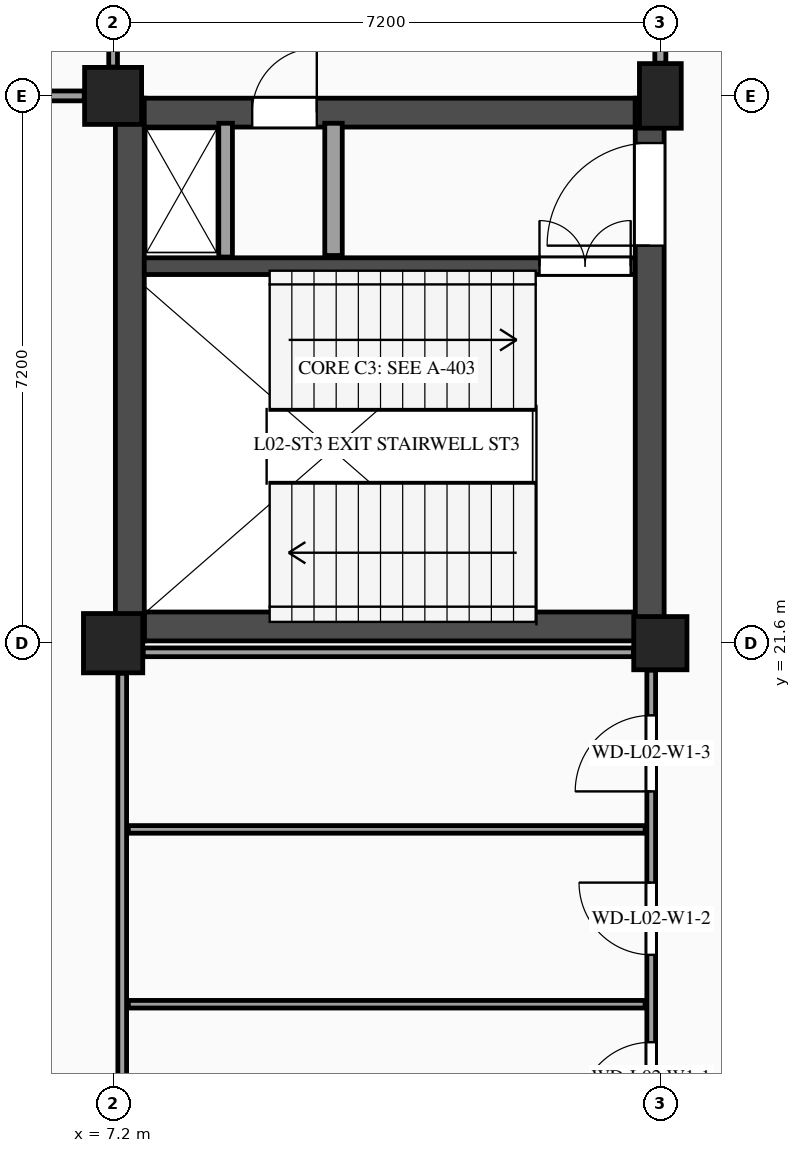
"""IFC4 building model, lengths in metres.
Left out: names, types, materials, properties, quantities, classifications, styles, units other than length and angle.
Written with IfcOpenShell. Run it as: python <this file> out.ifc"""

import sys

from ifc_helpers import new_model, si_unit, direction, frame, frame_2d, origin, origin_2d, place, context, subcontext, project, spatial, rectangle, extrude, element, fill, save


model = new_model("IFC4")
c1 = context("Model", 3, precision=1e-05, world=origin(), true_north=direction((0.0, 1.0)))
c2 = subcontext(c1, "Body", "Model", "MODEL_VIEW")
j1 = project(units=[si_unit("LENGTHUNIT", "METRE"), si_unit("PLANEANGLEUNIT", "RADIAN")], contexts=[c1])
p1 = place(None, origin())
s1 = spatial("IfcSite", under=j1, at=p1, CompositionType="ELEMENT")
p2 = place(p1, origin())
s2 = spatial("IfcBuilding", under=s1, at=p2, CompositionType="ELEMENT")
p3 = place(p2, frame((0.0, 0.0, 9.9)))
s3 = spatial("IfcBuildingStorey", under=s2, at=p3, CompositionType="ELEMENT", Elevation=9.9)
p4 = place(p3, frame((7.2, 21.6, 0.0), z_axis=(0.0, 0.0, 1.0), x_axis=(1.0, 0.0, 0.0)))
e1 = element("IfcColumn", 1, at=p4, inside=s3, PredefinedType="COLUMN", context=c2, shape_type="SweptSolid", body=[
    extrude(rectangle(XDim=0.78, YDim=0.78, at=origin_2d()), origin(), (0.0, 0.0, 1.0), 4.5),
])
p5 = place(p3, frame((7.2, 28.8, 0.0), z_axis=(0.0, 0.0, 1.0), x_axis=(1.0, 0.0, 0.0)))
e2 = element("IfcColumn", 2, at=p5, inside=s3, PredefinedType="COLUMN", context=c2, shape_type="SweptSolid", body=[
    extrude(rectangle(XDim=0.75, YDim=0.75, at=origin_2d()), origin(), (0.0, 0.0, 1.0), 4.5),
])
p6 = place(p3, frame((14.4, 21.6, 0.0), z_axis=(0.0, 0.0, 1.0), x_axis=(1.0, 0.0, 0.0)))
e3 = element("IfcColumn", 3, at=p6, inside=s3, PredefinedType="COLUMN", context=c2, shape_type="SweptSolid", body=[
    extrude(rectangle(XDim=0.7, YDim=0.7, at=origin_2d()), origin(), (0.0, 0.0, 1.0), 4.5),
])
p7 = place(p3, frame((14.4, 28.8, 0.0), z_axis=(0.0, 0.0, 1.0), x_axis=(1.0, 0.0, 0.0)))
e4 = element("IfcColumn", 4, at=p7, inside=s3, PredefinedType="COLUMN", context=c2, shape_type="SweptSolid", body=[
    extrude(rectangle(XDim=0.55, YDim=0.85, at=origin_2d()), origin(), (0.0, 0.0, 1.0), 4.5),
])
p8 = place(p3, frame((7.61, 21.82, 0.0), z_axis=(0.0, 0.0, 1.0), x_axis=(1.0, 0.0, 0.0)))
e5 = element("IfcWall", 5, at=p8, inside=s3, PredefinedType="SHEAR", context=c2, shape_type="SweptSolid", body=[
    extrude(rectangle(XDim=6.46, YDim=0.38, at=frame_2d((3.23, 0.0))), origin(), (0.0, 0.0, 1.0), 4.225),
])
p9 = place(p3, frame((7.42, 28.77, 0.0), z_axis=(0.0, 0.0, 1.0), x_axis=(0.0, -1.0, 0.0)))
e6 = element("IfcWall", 6, at=p9, inside=s3, PredefinedType="SHEAR", context=c2, shape_type="SweptSolid", body=[
    extrude(rectangle(XDim=7.14, YDim=0.38, at=frame_2d((3.57, 0.0))), origin(), (0.0, 0.0, 1.0), 4.225),
])
p10 = place(p3, frame((7.61, 28.58, 0.0), z_axis=(0.0, 0.0, 1.0), x_axis=(1.0, 0.0, 0.0)))
e7 = element("IfcWall", 7, at=p10, inside=s3, PredefinedType="SHEAR", context=c2, shape_type="SweptSolid", body=[
    extrude(rectangle(XDim=6.46, YDim=0.38, at=frame_2d((3.23, 0.0))), origin(), (0.0, 0.0, 1.0), 4.225),
])
p11 = place(p10, frame((1.42, 0.0, 0.0)))
e8 = element("IfcOpeningElement", 8, at=p11, cuts=e7, PredefinedType="OPENING", context=c2, shape_type="SweptSolid", body=[
    extrude(rectangle(XDim=0.85, YDim=2.1, at=frame_2d((0.425, 1.05))), frame((0.0, 0.2, 0.0), z_axis=(0.0, -1.0, 0.0), x_axis=(1.0, 0.0, 0.0)), (0.0, 0.0, 1.0), 0.4),
])
p12 = place(p3, frame((7.61, 26.56, 0.0), z_axis=(0.0, 0.0, 1.0), x_axis=(1.0, 0.0, 0.0)))
e9 = element("IfcWall", 9, at=p12, inside=s3, PredefinedType="SHEAR", context=c2, shape_type="SweptSolid", body=[
    extrude(rectangle(XDim=6.46, YDim=0.22, at=frame_2d((3.23, 0.0))), origin(), (0.0, 0.0, 1.0), 4.225),
])
p13 = place(p12, frame((5.2, 0.0, 0.0)))
e10 = element("IfcOpeningElement", 10, at=p13, cuts=e9, PredefinedType="OPENING", context=c2, shape_type="SweptSolid", body=[
    extrude(rectangle(XDim=1.2, YDim=2.2, at=frame_2d((0.6, 1.1))), frame((0.0, 0.12, 0.0), z_axis=(0.0, -1.0, 0.0), x_axis=(1.0, 0.0, 0.0)), (0.0, 0.0, 1.0), 0.24),
])
p14 = place(p3, frame((10.1, 26.7, 0.0), z_axis=(0.0, 0.0, 1.0), x_axis=(0.0, 1.0, 0.0)))
e11 = element("IfcWall", 11, at=p14, inside=s3, PredefinedType="PARTITIONING", context=c2, shape_type="SweptSolid", body=[
    extrude(rectangle(XDim=1.74, YDim=0.23, at=frame_2d((0.87, 0.0))), origin(), (0.0, 0.0, 1.0), 4.225),
])
p15 = place(p3, frame((8.68, 26.68, 0.0), z_axis=(0.0, 0.0, 1.0), x_axis=(0.0, 1.0, 0.0)))
e12 = element("IfcWall", 12, at=p15, inside=s3, PredefinedType="PARTITIONING", context=c2, shape_type="SweptSolid", body=[
    extrude(rectangle(XDim=1.76, YDim=0.18, at=frame_2d((0.88, 0.0))), origin(), (0.0, 0.0, 1.0), 4.225),
])
p16 = place(p3, frame((14.26, 21.63, 0.0), z_axis=(0.0, 0.0, 1.0), x_axis=(0.0, 1.0, 0.0)))
e13 = element("IfcWall", 13, at=p16, inside=s3, PredefinedType="SHEAR", context=c2, shape_type="SweptSolid", body=[
    extrude(rectangle(XDim=7.14, YDim=0.38, at=frame_2d((3.57, 0.0))), origin(), (0.0, 0.0, 1.0), 4.225),
])
p17 = place(p16, frame((5.2, 0.0, 0.0)))
e14 = element("IfcOpeningElement", 14, at=p17, cuts=e13, PredefinedType="OPENING", context=c2, shape_type="SweptSolid", body=[
    extrude(rectangle(XDim=1.35, YDim=2.15, at=frame_2d((0.675, 1.075))), frame((0.0, 0.2, 0.0), z_axis=(0.0, -1.0, 0.0), x_axis=(1.0, 0.0, 0.0)), (0.0, 0.0, 1.0), 0.4),
])
p18 = place(p3, frame((7.595, 21.48, 0.0), z_axis=(0.0, 0.0, 1.0), x_axis=(1.0, 0.0, 0.0)))
e15 = element("IfcWall", 15, at=p18, inside=s3, PredefinedType="PARTITIONING", context=c2, shape_type="SweptSolid", body=[
    extrude(rectangle(XDim=6.45, YDim=0.115, at=frame_2d((3.225, 0.0))), origin(), (0.0, 0.0, 1.0), 3.5),
])
p19 = place(p3, frame((7.32, 14.705, 0.0), z_axis=(0.0, 0.0, 1.0), x_axis=(0.0, 1.0, 0.0)))
e16 = element("IfcWall", 16, at=p19, inside=s3, PredefinedType="PARTITIONING", context=c2, shape_type="SweptSolid", body=[
    extrude(rectangle(XDim=6.5, YDim=0.115, at=frame_2d((3.25, 0.0))), origin(), (0.0, 0.0, 1.0), 3.53),
])
p20 = place(p3, frame((14.28, 14.765, 0.0), z_axis=(0.0, 0.0, 1.0), x_axis=(0.0, 1.0, 0.0)))
e17 = element("IfcWall", 17, at=p20, inside=s3, PredefinedType="PARTITIONING", context=c2, shape_type="SweptSolid", body=[
    extrude(rectangle(XDim=6.48, YDim=0.115, at=frame_2d((3.24, 0.0))), origin(), (0.0, 0.0, 1.0), 3.53),
])
p21 = place(p20, frame((0.635, 0.0, 0.0)))
e18 = element("IfcOpeningElement", 18, at=p21, cuts=e17, PredefinedType="OPENING", context=c2, shape_type="SweptSolid", body=[
    extrude(rectangle(XDim=0.95, YDim=2.1, at=frame_2d((0.475, 1.05))), frame((0.0, 0.067, 0.0), z_axis=(0.0, -1.0, 0.0), x_axis=(1.0, 0.0, 0.0)), (0.0, 0.0, 1.0), 0.135),
])
p22 = place(p20, frame((2.735, 0.0, 0.0)))
e19 = element("IfcOpeningElement", 19, at=p22, cuts=e17, PredefinedType="OPENING", context=c2, shape_type="SweptSolid", body=[
    extrude(rectangle(XDim=0.95, YDim=2.1, at=frame_2d((0.475, 1.05))), frame((0.0, 0.067, 0.0), z_axis=(0.0, -1.0, 0.0), x_axis=(1.0, 0.0, 0.0)), (0.0, 0.0, 1.0), 0.135),
])
p23 = place(p20, frame((4.885, 0.0, 0.0)))
e20 = element("IfcOpeningElement", 20, at=p23, cuts=e17, PredefinedType="OPENING", context=c2, shape_type="SweptSolid", body=[
    extrude(rectangle(XDim=1.0, YDim=2.15, at=frame_2d((0.5, 1.075))), frame((0.0, 0.067, 0.0), z_axis=(0.0, -1.0, 0.0), x_axis=(1.0, 0.0, 0.0)), (0.0, 0.0, 1.0), 0.135),
])
for number, where, z_axis, x_axis in (
    (21, (7.4, 16.85, 0.0), (0.0, 0.0, 1.0), (1.0, 0.0, 0.0)),
    (22, (7.4, 19.15, 0.0), (0.0, 0.0, 1.0), (1.0, 0.0, 0.0)),
):
    element("IfcWall", number, at=place(p3, frame(where, z_axis=z_axis, x_axis=x_axis)), inside=s3, PredefinedType="PARTITIONING", context=c2, shape_type="SweptSolid", body=[
        extrude(rectangle(XDim=6.8, YDim=0.1, at=frame_2d((3.4, 0.0))), origin(), (0.0, 0.0, 1.0), 4.225),
    ])
p24 = place(p3, frame((0.28, 28.8, 0.0), z_axis=(0.0, 0.0, 1.0), x_axis=(1.0, 0.0, 0.0)))
e23 = element("IfcWall", 23, at=p24, inside=s3, PredefinedType="PARTITIONING", context=c2, shape_type="SweptSolid", body=[
    extrude(rectangle(XDim=6.54, YDim=0.13, at=frame_2d((3.27, 0.0))), origin(), (0.0, 0.0, 1.0), 3.485),
])
p25 = place(p24, frame((2.49, 0.0, 0.0)))
e24 = element("IfcOpeningElement", 24, at=p25, cuts=e23, PredefinedType="OPENING", context=c2, shape_type="SweptSolid", body=[
    extrude(rectangle(XDim=1.56, YDim=2.25, at=frame_2d((0.78, 1.125))), frame((0.0, 0.075, 0.0), z_axis=(0.0, -1.0, 0.0), x_axis=(1.0, 0.0, 0.0)), (0.0, 0.0, 1.0), 0.15),
])
p26 = place(p3, frame((7.2, 29.18, 0.0), z_axis=(0.0, 0.0, 1.0), x_axis=(0.0, 1.0, 0.0)))
e25 = element("IfcWall", 25, at=p26, inside=s3, PredefinedType="PARTITIONING", context=c2, shape_type="SweptSolid", body=[
    extrude(rectangle(XDim=6.455, YDim=0.115, at=frame_2d((3.228, 0.0))), origin(), (0.0, 0.0, 1.0), 3.595),
])
p27 = place(p3, frame((14.4, 29.23, 0.0), z_axis=(0.0, 0.0, 1.0), x_axis=(0.0, 1.0, 0.0)))
e26 = element("IfcWall", 26, at=p27, inside=s3, PredefinedType="PARTITIONING", context=c2, shape_type="SweptSolid", body=[
    extrude(rectangle(XDim=6.465, YDim=0.145, at=frame_2d((3.232, 0.0))), origin(), (0.0, 0.0, 1.0), 3.595),
])
p28 = place(p27, frame((2.593, 0.0, 0.0)))
e27 = element("IfcOpeningElement", 27, at=p28, cuts=e26, PredefinedType="OPENING", context=c2, shape_type="SweptSolid", body=[
    extrude(rectangle(XDim=1.28, YDim=2.24, at=frame_2d((0.64, 1.12))), frame((0.0, 0.083, 0.0), z_axis=(0.0, -1.0, 0.0), x_axis=(1.0, 0.0, 0.0)), (0.0, 0.0, 1.0), 0.165),
])
p29 = place(p11, origin())
e28 = element("IfcDoor", 28, at=p29, inside=s3, OperationType="SINGLE_SWING_RIGHT", PredefinedType="DOOR", context=c2, shape_type="SweptSolid", body=[
    extrude(rectangle(XDim=0.85, YDim=2.1, at=frame_2d((0.425, 1.05))), frame((0.0, 0.025, 0.0), z_axis=(0.0, -1.0, 0.0), x_axis=(1.0, 0.0, 0.0)), (0.0, 0.0, 1.0), 0.05),
])
fill(e8, e28)
p30 = place(p13, origin())
e29 = element("IfcDoor", 29, at=p30, inside=s3, OperationType="DOUBLE_DOOR_SINGLE_SWING", PredefinedType="DOOR", context=c2, shape_type="SweptSolid", body=[
    extrude(rectangle(XDim=1.2, YDim=2.2, at=frame_2d((0.6, 1.1))), frame((0.0, 0.025, 0.0), z_axis=(0.0, -1.0, 0.0), x_axis=(1.0, 0.0, 0.0)), (0.0, 0.0, 1.0), 0.05),
])
fill(e10, e29)
p31 = place(p17, origin())
e30 = element("IfcDoor", 30, at=p31, inside=s3, OperationType="SINGLE_SWING_LEFT", PredefinedType="DOOR", context=c2, shape_type="SweptSolid", body=[
    extrude(rectangle(XDim=1.35, YDim=2.15, at=frame_2d((0.675, 1.075))), frame((0.0, 0.025, 0.0), z_axis=(0.0, -1.0, 0.0), x_axis=(1.0, 0.0, 0.0)), (0.0, 0.0, 1.0), 0.05),
])
fill(e14, e30)
p32 = place(p21, origin())
e31 = element("IfcDoor", 31, at=p32, inside=s3, OperationType="SINGLE_SWING_LEFT", PredefinedType="DOOR", context=c2, shape_type="SweptSolid", body=[
    extrude(rectangle(XDim=0.95, YDim=2.1, at=frame_2d((0.475, 1.05))), frame((0.0, 0.025, 0.0), z_axis=(0.0, -1.0, 0.0), x_axis=(1.0, 0.0, 0.0)), (0.0, 0.0, 1.0), 0.05),
])
fill(e18, e31)
p33 = place(p22, origin())
e32 = element("IfcDoor", 32, at=p33, inside=s3, OperationType="SINGLE_SWING_RIGHT", PredefinedType="DOOR", context=c2, shape_type="SweptSolid", body=[
    extrude(rectangle(XDim=0.95, YDim=2.1, at=frame_2d((0.475, 1.05))), frame((0.0, 0.025, 0.0), z_axis=(0.0, -1.0, 0.0), x_axis=(1.0, 0.0, 0.0)), (0.0, 0.0, 1.0), 0.05),
])
fill(e19, e32)
p34 = place(p23, origin())
e33 = element("IfcDoor", 33, at=p34, inside=s3, OperationType="SINGLE_SWING_LEFT", PredefinedType="DOOR", context=c2, shape_type="SweptSolid", body=[
    extrude(rectangle(XDim=1.0, YDim=2.15, at=frame_2d((0.5, 1.075))), frame((0.0, 0.025, 0.0), z_axis=(0.0, -1.0, 0.0), x_axis=(1.0, 0.0, 0.0)), (0.0, 0.0, 1.0), 0.05),
])
fill(e20, e33)
save(model, sys.argv[1])
